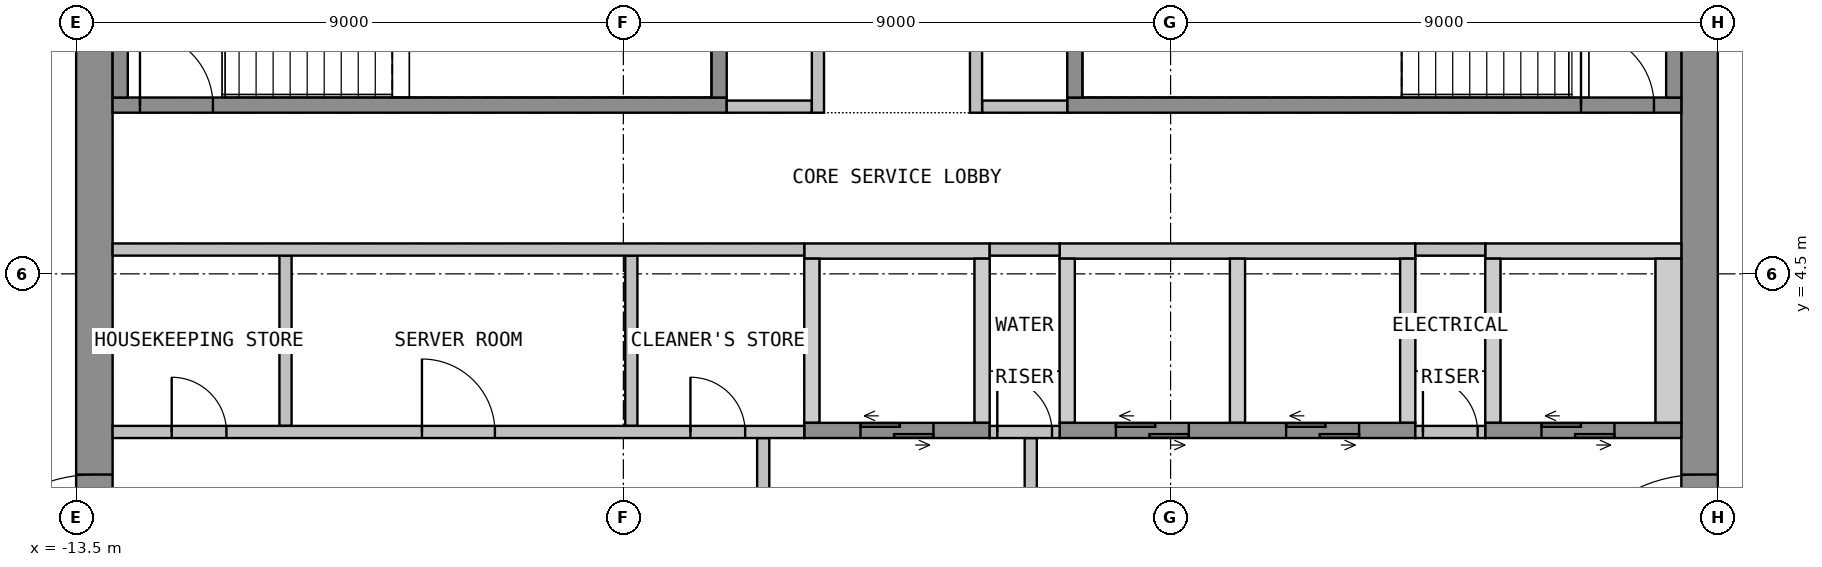
"""IFC4 building model, lengths in metres.
Left out: names, types, materials, properties, quantities, classifications, styles, units other than length and angle.
Written with IfcOpenShell. Run it as: python <this file> out.ifc"""

import sys

from ifc_helpers import new_model, si_unit, direction, frame, frame_2d, origin, place, context, subcontext, project, spatial, polyline, rectangle, outline, extrude, element, fill, save


model = new_model("IFC4")
c1 = context("Model", 3, precision=1e-05, world=origin(), true_north=direction((0.0, 1.0)))
c2 = subcontext(c1, "Body", "Model", "MODEL_VIEW")
j1 = project(units=[si_unit("LENGTHUNIT", "METRE"), si_unit("PLANEANGLEUNIT", "RADIAN")], contexts=[c1])
p1 = place(None, origin())
s1 = spatial("IfcSite", under=j1, at=p1, CompositionType="ELEMENT")
p2 = place(p1, origin())
s2 = spatial("IfcBuilding", under=s1, at=p2, CompositionType="ELEMENT")
p3 = place(p2, frame((0.0, 0.0, 246.9)))
s3 = spatial("IfcBuildingStorey", under=s2, at=p3, CompositionType="ELEMENT", Elevation=246.9)
p4 = place(p3, frame((-13.2, -10.65, 0.0), z_axis=(0.0, 0.0, 1.0), x_axis=(0.0, 1.0, 0.0)))
e1 = element("IfcWall", 1, at=p4, inside=s3, PredefinedType="SHEAR", context=c2, shape_type="SweptSolid", body=[
    extrude(rectangle(XDim=21.3, YDim=0.6, at=frame_2d((10.65, 0.0))), origin(), (0.0, 0.0, 1.0), 3.575),
])
p5 = place(p4, frame((9.45, 0.0, 0.0)))
e2 = element("IfcOpeningElement", 2, at=p5, cuts=e1, PredefinedType="OPENING", context=c2, shape_type="SweptSolid", body=[
    extrude(rectangle(XDim=2.4, YDim=2.1, at=frame_2d((1.2, 1.05))), frame((0.0, 0.31, 0.0), z_axis=(0.0, -1.0, 0.0), x_axis=(1.0, 0.0, 0.0)), (0.0, 0.0, 1.0), 0.62),
])
p6 = place(p3, frame((13.2, -10.65, 0.0), z_axis=(0.0, 0.0, 1.0), x_axis=(0.0, 1.0, 0.0)))
e3 = element("IfcWall", 3, at=p6, inside=s3, PredefinedType="SHEAR", context=c2, shape_type="SweptSolid", body=[
    extrude(rectangle(XDim=21.3, YDim=0.6, at=frame_2d((10.65, 0.0))), origin(), (0.0, 0.0, 1.0), 3.575),
])
p7 = place(p6, frame((9.45, 0.0, 0.0)))
e4 = element("IfcOpeningElement", 4, at=p7, cuts=e3, PredefinedType="OPENING", context=c2, shape_type="SweptSolid", body=[
    extrude(rectangle(XDim=2.4, YDim=2.1, at=frame_2d((1.2, 1.05))), frame((0.0, 0.31, 0.0), z_axis=(0.0, -1.0, 0.0), x_axis=(1.0, 0.0, 0.0)), (0.0, 0.0, 1.0), 0.62),
])
p8 = place(p3, origin())
e5 = element("IfcWall", 5, at=p8, inside=s3, PredefinedType="SHEAR", context=c2, shape_type="SweptSolid", body=[
    extrude(outline(polyline([(-1.525, 4.75), (1.525, 4.75), (1.525, 5.0), (-1.525, 5.0), (-1.525, 4.75)])), origin(), (0.0, 0.0, 1.0), 3.575),
])
p9 = place(p3, origin())
e6 = element("IfcWall", 6, at=p9, inside=s3, PredefinedType="SHEAR", context=c2, shape_type="SweptSolid", body=[
    extrude(outline(polyline([(2.675, 4.75), (8.525, 4.75), (8.525, 5.0), (2.675, 5.0), (2.675, 4.75)])), origin(), (0.0, 0.0, 1.0), 3.575),
])
p10 = place(p3, origin())
e7 = element("IfcWall", 7, at=p10, inside=s3, PredefinedType="SHEAR", context=c2, shape_type="SweptSolid", body=[
    extrude(outline(polyline([(9.675, 4.75), (12.9, 4.75), (12.9, 5.0), (9.675, 5.0), (9.675, 4.75)])), origin(), (0.0, 0.0, 1.0), 3.575),
])
p11 = place(p3, origin())
e8 = element("IfcWall", 8, at=p11, inside=s3, PredefinedType="SHEAR", context=c2, shape_type="SweptSolid", body=[
    extrude(outline(polyline([(-1.525, 2.05), (-1.275, 2.05), (-1.275, 4.75), (-1.525, 4.75), (-1.525, 2.05)])), origin(), (0.0, 0.0, 1.0), 3.575),
])
p12 = place(p3, origin())
e9 = element("IfcWall", 9, at=p12, inside=s3, PredefinedType="SHEAR", context=c2, shape_type="SweptSolid", body=[
    extrude(outline(polyline([(1.275, 2.05), (1.525, 2.05), (1.525, 4.75), (1.275, 4.75), (1.275, 2.05)])), origin(), (0.0, 0.0, 1.0), 3.575),
])
p13 = place(p3, origin())
e10 = element("IfcWall", 10, at=p13, inside=s3, PredefinedType="SHEAR", context=c2, shape_type="SweptSolid", body=[
    extrude(outline(polyline([(2.675, 2.05), (2.925, 2.05), (2.925, 4.75), (2.675, 4.75), (2.675, 2.05)])), origin(), (0.0, 0.0, 1.0), 3.575),
])
p14 = place(p3, origin())
e11 = element("IfcWall", 11, at=p14, inside=s3, PredefinedType="SHEAR", context=c2, shape_type="SweptSolid", body=[
    extrude(outline(polyline([(5.475, 2.05), (5.725, 2.05), (5.725, 4.75), (5.475, 4.75), (5.475, 2.05)])), origin(), (0.0, 0.0, 1.0), 3.575),
])
p15 = place(p3, origin())
e12 = element("IfcWall", 12, at=p15, inside=s3, PredefinedType="SHEAR", context=c2, shape_type="SweptSolid", body=[
    extrude(outline(polyline([(8.275, 2.05), (8.525, 2.05), (8.525, 4.75), (8.275, 4.75), (8.275, 2.05)])), origin(), (0.0, 0.0, 1.0), 3.575),
])
p16 = place(p3, origin())
e13 = element("IfcWall", 13, at=p16, inside=s3, PredefinedType="SHEAR", context=c2, shape_type="SweptSolid", body=[
    extrude(outline(polyline([(9.675, 2.05), (9.925, 2.05), (9.925, 4.75), (9.675, 4.75), (9.675, 2.05)])), origin(), (0.0, 0.0, 1.0), 3.575),
])
p17 = place(p3, origin())
e14 = element("IfcWall", 14, at=p17, inside=s3, PredefinedType="SHEAR", context=c2, shape_type="SweptSolid", body=[
    extrude(outline(polyline([(12.475, 2.05), (12.9, 2.05), (12.9, 4.75), (12.475, 4.75), (12.475, 2.05)])), origin(), (0.0, 0.0, 1.0), 3.575),
])
p18 = place(p3, frame((-1.525, 1.925, 0.0), z_axis=(0.0, 0.0, 1.0), x_axis=(1.0, 0.0, 0.0)))
e15 = element("IfcWall", 15, at=p18, inside=s3, PredefinedType="SHEAR", context=c2, shape_type="SweptSolid", body=[
    extrude(rectangle(XDim=3.05, YDim=0.25, at=frame_2d((1.525, 0.0))), origin(), (0.0, 0.0, 1.0), 3.575),
])
p19 = place(p18, frame((0.925, 0.0, 0.0)))
e16 = element("IfcOpeningElement", 16, at=p19, cuts=e15, PredefinedType="OPENING", context=c2, shape_type="SweptSolid", body=[
    extrude(rectangle(XDim=1.2, YDim=2.1, at=frame_2d((0.6, 1.05))), frame((0.0, 0.135, 0.0), z_axis=(0.0, -1.0, 0.0), x_axis=(1.0, 0.0, 0.0)), (0.0, 0.0, 1.0), 0.27),
])
p20 = place(p3, frame((2.675, 1.925, 0.0), z_axis=(0.0, 0.0, 1.0), x_axis=(1.0, 0.0, 0.0)))
e17 = element("IfcWall", 17, at=p20, inside=s3, PredefinedType="SHEAR", context=c2, shape_type="SweptSolid", body=[
    extrude(rectangle(XDim=5.85, YDim=0.25, at=frame_2d((2.925, 0.0))), origin(), (0.0, 0.0, 1.0), 3.575),
])
p21 = place(p20, frame((0.925, 0.0, 0.0)))
e18 = element("IfcOpeningElement", 18, at=p21, cuts=e17, PredefinedType="OPENING", context=c2, shape_type="SweptSolid", body=[
    extrude(rectangle(XDim=1.2, YDim=2.1, at=frame_2d((0.6, 1.05))), frame((0.0, 0.135, 0.0), z_axis=(0.0, -1.0, 0.0), x_axis=(1.0, 0.0, 0.0)), (0.0, 0.0, 1.0), 0.27),
])
p22 = place(p20, frame((3.725, 0.0, 0.0)))
e19 = element("IfcOpeningElement", 19, at=p22, cuts=e17, PredefinedType="OPENING", context=c2, shape_type="SweptSolid", body=[
    extrude(rectangle(XDim=1.2, YDim=2.1, at=frame_2d((0.6, 1.05))), frame((0.0, 0.135, 0.0), z_axis=(0.0, -1.0, 0.0), x_axis=(1.0, 0.0, 0.0)), (0.0, 0.0, 1.0), 0.27),
])
p23 = place(p3, frame((9.675, 1.925, 0.0), z_axis=(0.0, 0.0, 1.0), x_axis=(1.0, 0.0, 0.0)))
e20 = element("IfcWall", 20, at=p23, inside=s3, PredefinedType="SHEAR", context=c2, shape_type="SweptSolid", body=[
    extrude(rectangle(XDim=3.225, YDim=0.25, at=frame_2d((1.612, 0.0))), origin(), (0.0, 0.0, 1.0), 3.575),
])
p24 = place(p23, frame((0.925, 0.0, 0.0)))
e21 = element("IfcOpeningElement", 21, at=p24, cuts=e20, PredefinedType="OPENING", context=c2, shape_type="SweptSolid", body=[
    extrude(rectangle(XDim=1.2, YDim=2.1, at=frame_2d((0.6, 1.05))), frame((0.0, 0.135, 0.0), z_axis=(0.0, -1.0, 0.0), x_axis=(1.0, 0.0, 0.0)), (0.0, 0.0, 1.0), 0.27),
])
p25 = place(p3, frame((-2.2, -1.8, 0.0), z_axis=(0.0, 0.0, 1.0), x_axis=(0.0, 1.0, 0.0)))
e22 = element("IfcWall", 22, at=p25, inside=s3, PredefinedType="PARTITIONING", context=c2, shape_type="SweptSolid", body=[
    extrude(rectangle(XDim=3.6, YDim=0.2, at=frame_2d((1.8, 0.0))), origin(), (0.0, 0.0, 1.0), 3.575),
])
p26 = place(p25, frame((1.2, 0.0, 0.0)))
e23 = element("IfcOpeningElement", 23, at=p26, cuts=e22, PredefinedType="OPENING", context=c2, shape_type="SweptSolid", body=[
    extrude(rectangle(XDim=1.2, YDim=2.1, at=frame_2d((0.6, 1.05))), frame((0.0, 0.11, 0.0), z_axis=(0.0, -1.0, 0.0), x_axis=(1.0, 0.0, 0.0)), (0.0, 0.0, 1.0), 0.22),
])
p27 = place(p3, frame((2.2, -1.8, 0.0), z_axis=(0.0, 0.0, 1.0), x_axis=(0.0, 1.0, 0.0)))
e24 = element("IfcWall", 24, at=p27, inside=s3, PredefinedType="PARTITIONING", context=c2, shape_type="SweptSolid", body=[
    extrude(rectangle(XDim=3.6, YDim=0.2, at=frame_2d((1.8, 0.0))), origin(), (0.0, 0.0, 1.0), 3.575),
])
p28 = place(p27, frame((1.2, 0.0, 0.0)))
e25 = element("IfcOpeningElement", 25, at=p28, cuts=e24, PredefinedType="OPENING", context=c2, shape_type="SweptSolid", body=[
    extrude(rectangle(XDim=1.2, YDim=2.1, at=frame_2d((0.6, 1.05))), frame((0.0, 0.11, 0.0), z_axis=(0.0, -1.0, 0.0), x_axis=(1.0, 0.0, 0.0)), (0.0, 0.0, 1.0), 0.22),
])
p29 = place(p3, frame((-12.9, 7.275, 0.0), z_axis=(0.0, 0.0, 1.0), x_axis=(1.0, 0.0, 0.0)))
e26 = element("IfcWall", 26, at=p29, inside=s3, PredefinedType="SHEAR", context=c2, shape_type="SweptSolid", body=[
    extrude(rectangle(XDim=10.1, YDim=0.25, at=frame_2d((5.05, 0.0))), origin(), (0.0, 0.0, 1.0), 3.575),
])
p30 = place(p29, frame((0.45, 0.0, 0.0)))
e27 = element("IfcOpeningElement", 27, at=p30, cuts=e26, PredefinedType="OPENING", context=c2, shape_type="SweptSolid", body=[
    extrude(rectangle(XDim=1.2, YDim=2.1, at=frame_2d((0.6, 1.05))), frame((0.0, 0.135, 0.0), z_axis=(0.0, -1.0, 0.0), x_axis=(1.0, 0.0, 0.0)), (0.0, 0.0, 1.0), 0.27),
])
for number, where, z_axis, x_axis in (
    (28, (-12.775, 7.4, 0.0), (0.0, 0.0, 1.0), (0.0, 1.0, 0.0)),
    (29, (-2.925, 7.4, 0.0), (0.0, 0.0, 1.0), (0.0, 1.0, 0.0)),
):
    element("IfcWall", number, at=place(p3, frame(where, z_axis=z_axis, x_axis=x_axis)), inside=s3, PredefinedType="SHEAR", context=c2, shape_type="SweptSolid", body=[
        extrude(rectangle(XDim=3.25, YDim=0.25, at=frame_2d((1.625, 0.0))), origin(), (0.0, 0.0, 1.0), 3.575),
    ])
p31 = place(p3, frame((2.8, 7.275, 0.0), z_axis=(0.0, 0.0, 1.0), x_axis=(1.0, 0.0, 0.0)))
e30 = element("IfcWall", 30, at=p31, inside=s3, PredefinedType="SHEAR", context=c2, shape_type="SweptSolid", body=[
    extrude(rectangle(XDim=10.1, YDim=0.25, at=frame_2d((5.05, 0.0))), origin(), (0.0, 0.0, 1.0), 3.575),
])
p32 = place(p31, frame((8.45, 0.0, 0.0)))
e31 = element("IfcOpeningElement", 31, at=p32, cuts=e30, PredefinedType="OPENING", context=c2, shape_type="SweptSolid", body=[
    extrude(rectangle(XDim=1.2, YDim=2.1, at=frame_2d((0.6, 1.05))), frame((0.0, 0.135, 0.0), z_axis=(0.0, -1.0, 0.0), x_axis=(1.0, 0.0, 0.0)), (0.0, 0.0, 1.0), 0.27),
])
for number, where, z_axis, x_axis in (
    (32, (2.925, 7.4, 0.0), (0.0, 0.0, 1.0), (0.0, 1.0, 0.0)),
    (33, (12.775, 7.4, 0.0), (0.0, 0.0, 1.0), (0.0, 1.0, 0.0)),
):
    element("IfcWall", number, at=place(p3, frame(where, z_axis=z_axis, x_axis=x_axis)), inside=s3, PredefinedType="SHEAR", context=c2, shape_type="SweptSolid", body=[
        extrude(rectangle(XDim=3.25, YDim=0.25, at=frame_2d((1.625, 0.0))), origin(), (0.0, 0.0, 1.0), 3.575),
    ])
for number, where, z_axis, x_axis in (
    (34, (-2.8, 7.25, 0.0), (0.0, 0.0, 1.0), (1.0, 0.0, 0.0)),
    (35, (1.4, 7.25, 0.0), (0.0, 0.0, 1.0), (1.0, 0.0, 0.0)),
):
    element("IfcWall", number, at=place(p3, frame(where, z_axis=z_axis, x_axis=x_axis)), inside=s3, PredefinedType="PARTITIONING", context=c2, shape_type="SweptSolid", body=[
        extrude(rectangle(XDim=1.4, YDim=0.2, at=frame_2d((0.7, 0.0))), origin(), (0.0, 0.0, 1.0), 3.575),
    ])
p33 = place(p3, frame((-1.3, 7.15, 0.0), z_axis=(0.0, 0.0, 1.0), x_axis=(0.0, 1.0, 0.0)))
e36 = element("IfcWall", 36, at=p33, inside=s3, PredefinedType="PARTITIONING", context=c2, shape_type="SweptSolid", body=[
    extrude(rectangle(XDim=3.5, YDim=0.2, at=frame_2d((1.75, 0.0))), origin(), (0.0, 0.0, 1.0), 3.575),
])
p34 = place(p33, frame((1.4, 0.0, 0.0)))
e37 = element("IfcOpeningElement", 37, at=p34, cuts=e36, PredefinedType="OPENING", context=c2, shape_type="SweptSolid", body=[
    extrude(rectangle(XDim=0.9, YDim=2.1, at=frame_2d((0.45, 1.05))), frame((0.0, 0.11, 0.0), z_axis=(0.0, -1.0, 0.0), x_axis=(1.0, 0.0, 0.0)), (0.0, 0.0, 1.0), 0.22),
])
p35 = place(p3, frame((1.3, 7.15, 0.0), z_axis=(0.0, 0.0, 1.0), x_axis=(0.0, 1.0, 0.0)))
e38 = element("IfcWall", 38, at=p35, inside=s3, PredefinedType="PARTITIONING", context=c2, shape_type="SweptSolid", body=[
    extrude(rectangle(XDim=3.5, YDim=0.2, at=frame_2d((1.75, 0.0))), origin(), (0.0, 0.0, 1.0), 3.575),
])
p36 = place(p35, frame((1.4, 0.0, 0.0)))
e39 = element("IfcOpeningElement", 39, at=p36, cuts=e38, PredefinedType="OPENING", context=c2, shape_type="SweptSolid", body=[
    extrude(rectangle(XDim=0.9, YDim=2.1, at=frame_2d((0.45, 1.05))), frame((0.0, 0.11, 0.0), z_axis=(0.0, -1.0, 0.0), x_axis=(1.0, 0.0, 0.0)), (0.0, 0.0, 1.0), 0.22),
])
for number, where, z_axis, x_axis in (
    (40, (-10.056, 2.0, 0.0), (0.0, 0.0, 1.0), (0.0, 1.0, 0.0)),
    (41, (-4.369, 2.0, 0.0), (0.0, 0.0, 1.0), (0.0, 1.0, 0.0)),
):
    element("IfcWall", number, at=place(p3, frame(where, z_axis=z_axis, x_axis=x_axis)), inside=s3, PredefinedType="PARTITIONING", context=c2, shape_type="SweptSolid", body=[
        extrude(rectangle(XDim=2.8, YDim=0.2, at=frame_2d((1.4, 0.0))), origin(), (0.0, 0.0, 1.0), 3.575),
    ])
p37 = place(p3, frame((-12.9, 1.9, 0.0), z_axis=(0.0, 0.0, 1.0), x_axis=(1.0, 0.0, 0.0)))
e42 = element("IfcWall", 42, at=p37, inside=s3, PredefinedType="PARTITIONING", context=c2, shape_type="SweptSolid", body=[
    extrude(rectangle(XDim=11.375, YDim=0.2, at=frame_2d((5.688, 0.0))), origin(), (0.0, 0.0, 1.0), 3.575),
])
p38 = place(p37, frame((0.972, 0.0, 0.0)))
e43 = element("IfcOpeningElement", 43, at=p38, cuts=e42, PredefinedType="OPENING", context=c2, shape_type="SweptSolid", body=[
    extrude(rectangle(XDim=0.9, YDim=2.1, at=frame_2d((0.45, 1.05))), frame((0.0, 0.11, 0.0), z_axis=(0.0, -1.0, 0.0), x_axis=(1.0, 0.0, 0.0)), (0.0, 0.0, 1.0), 0.22),
])
p39 = place(p37, frame((5.087, 0.0, 0.0)))
e44 = element("IfcOpeningElement", 44, at=p39, cuts=e42, PredefinedType="OPENING", context=c2, shape_type="SweptSolid", body=[
    extrude(rectangle(XDim=1.2, YDim=2.1, at=frame_2d((0.6, 1.05))), frame((0.0, 0.11, 0.0), z_axis=(0.0, -1.0, 0.0), x_axis=(1.0, 0.0, 0.0)), (0.0, 0.0, 1.0), 0.22),
])
p40 = place(p37, frame((9.503, 0.0, 0.0)))
e45 = element("IfcOpeningElement", 45, at=p40, cuts=e42, PredefinedType="OPENING", context=c2, shape_type="SweptSolid", body=[
    extrude(rectangle(XDim=0.9, YDim=2.1, at=frame_2d((0.45, 1.05))), frame((0.0, 0.11, 0.0), z_axis=(0.0, -1.0, 0.0), x_axis=(1.0, 0.0, 0.0)), (0.0, 0.0, 1.0), 0.22),
])
p41 = place(p3, frame((-12.9, 4.9, 0.0), z_axis=(0.0, 0.0, 1.0), x_axis=(1.0, 0.0, 0.0)))
e46 = element("IfcWall", 46, at=p41, inside=s3, PredefinedType="PARTITIONING", context=c2, shape_type="SweptSolid", body=[
    extrude(rectangle(XDim=11.375, YDim=0.2, at=frame_2d((5.688, 0.0))), origin(), (0.0, 0.0, 1.0), 3.575),
])
p42 = place(p3, frame((1.525, 1.9, 0.0), z_axis=(0.0, 0.0, 1.0), x_axis=(1.0, 0.0, 0.0)))
e47 = element("IfcWall", 47, at=p42, inside=s3, PredefinedType="PARTITIONING", context=c2, shape_type="SweptSolid", body=[
    extrude(rectangle(XDim=1.15, YDim=0.2, at=frame_2d((0.575, 0.0))), origin(), (0.0, 0.0, 1.0), 3.575),
])
p43 = place(p42, frame((0.125, 0.0, 0.0)))
e48 = element("IfcOpeningElement", 48, at=p43, cuts=e47, PredefinedType="OPENING", context=c2, shape_type="SweptSolid", body=[
    extrude(rectangle(XDim=0.9, YDim=2.1, at=frame_2d((0.45, 1.05))), frame((0.0, 0.11, 0.0), z_axis=(0.0, -1.0, 0.0), x_axis=(1.0, 0.0, 0.0)), (0.0, 0.0, 1.0), 0.22),
])
p44 = place(p3, frame((1.525, 4.9, 0.0), z_axis=(0.0, 0.0, 1.0), x_axis=(1.0, 0.0, 0.0)))
e49 = element("IfcWall", 49, at=p44, inside=s3, PredefinedType="PARTITIONING", context=c2, shape_type="SweptSolid", body=[
    extrude(rectangle(XDim=1.15, YDim=0.2, at=frame_2d((0.575, 0.0))), origin(), (0.0, 0.0, 1.0), 3.575),
])
p45 = place(p3, frame((8.525, 1.9, 0.0), z_axis=(0.0, 0.0, 1.0), x_axis=(1.0, 0.0, 0.0)))
e50 = element("IfcWall", 50, at=p45, inside=s3, PredefinedType="PARTITIONING", context=c2, shape_type="SweptSolid", body=[
    extrude(rectangle(XDim=1.15, YDim=0.2, at=frame_2d((0.575, 0.0))), origin(), (0.0, 0.0, 1.0), 3.575),
])
p46 = place(p45, frame((0.125, 0.0, 0.0)))
e51 = element("IfcOpeningElement", 51, at=p46, cuts=e50, PredefinedType="OPENING", context=c2, shape_type="SweptSolid", body=[
    extrude(rectangle(XDim=0.9, YDim=2.1, at=frame_2d((0.45, 1.05))), frame((0.0, 0.11, 0.0), z_axis=(0.0, -1.0, 0.0), x_axis=(1.0, 0.0, 0.0)), (0.0, 0.0, 1.0), 0.22),
])
p47 = place(p3, frame((8.525, 4.9, 0.0), z_axis=(0.0, 0.0, 1.0), x_axis=(1.0, 0.0, 0.0)))
e52 = element("IfcWall", 52, at=p47, inside=s3, PredefinedType="PARTITIONING", context=c2, shape_type="SweptSolid", body=[
    extrude(rectangle(XDim=1.15, YDim=0.2, at=frame_2d((0.575, 0.0))), origin(), (0.0, 0.0, 1.0), 3.575),
])
p48 = place(p5, origin())
e53 = element("IfcDoor", 53, at=p48, inside=s3, OperationType="DOUBLE_DOOR_DOUBLE_SWING", PredefinedType="DOOR", context=c2, shape_type="SweptSolid", body=[
    extrude(rectangle(XDim=2.4, YDim=2.1, at=frame_2d((1.2, 1.05))), frame((0.0, 0.025, 0.0), z_axis=(0.0, -1.0, 0.0), x_axis=(1.0, 0.0, 0.0)), (0.0, 0.0, 1.0), 0.05),
])
fill(e2, e53)
p49 = place(p7, origin())
e54 = element("IfcDoor", 54, at=p49, inside=s3, OperationType="DOUBLE_DOOR_DOUBLE_SWING", PredefinedType="DOOR", context=c2, shape_type="SweptSolid", body=[
    extrude(rectangle(XDim=2.4, YDim=2.1, at=frame_2d((1.2, 1.05))), frame((0.0, 0.025, 0.0), z_axis=(0.0, -1.0, 0.0), x_axis=(1.0, 0.0, 0.0)), (0.0, 0.0, 1.0), 0.05),
])
fill(e4, e54)
p50 = place(p19, origin())
e55 = element("IfcDoor", 55, at=p50, inside=s3, OperationType="DOUBLE_DOOR_SLIDING", PredefinedType="DOOR", context=c2, shape_type="SweptSolid", body=[
    extrude(rectangle(XDim=1.2, YDim=2.1, at=frame_2d((0.6, 1.05))), frame((0.0, 0.025, 0.0), z_axis=(0.0, -1.0, 0.0), x_axis=(1.0, 0.0, 0.0)), (0.0, 0.0, 1.0), 0.05),
])
fill(e16, e55)
p51 = place(p21, origin())
e56 = element("IfcDoor", 56, at=p51, inside=s3, OperationType="DOUBLE_DOOR_SLIDING", PredefinedType="DOOR", context=c2, shape_type="SweptSolid", body=[
    extrude(rectangle(XDim=1.2, YDim=2.1, at=frame_2d((0.6, 1.05))), frame((0.0, 0.025, 0.0), z_axis=(0.0, -1.0, 0.0), x_axis=(1.0, 0.0, 0.0)), (0.0, 0.0, 1.0), 0.05),
])
fill(e18, e56)
p52 = place(p22, origin())
e57 = element("IfcDoor", 57, at=p52, inside=s3, OperationType="DOUBLE_DOOR_SLIDING", PredefinedType="DOOR", context=c2, shape_type="SweptSolid", body=[
    extrude(rectangle(XDim=1.2, YDim=2.1, at=frame_2d((0.6, 1.05))), frame((0.0, 0.025, 0.0), z_axis=(0.0, -1.0, 0.0), x_axis=(1.0, 0.0, 0.0)), (0.0, 0.0, 1.0), 0.05),
])
fill(e19, e57)
p53 = place(p24, origin())
e58 = element("IfcDoor", 58, at=p53, inside=s3, OperationType="DOUBLE_DOOR_SLIDING", PredefinedType="DOOR", context=c2, shape_type="SweptSolid", body=[
    extrude(rectangle(XDim=1.2, YDim=2.1, at=frame_2d((0.6, 1.05))), frame((0.0, 0.025, 0.0), z_axis=(0.0, -1.0, 0.0), x_axis=(1.0, 0.0, 0.0)), (0.0, 0.0, 1.0), 0.05),
])
fill(e21, e58)
p54 = place(p30, origin())
e59 = element("IfcDoor", 59, at=p54, inside=s3, OperationType="SINGLE_SWING_LEFT", PredefinedType="DOOR", context=c2, shape_type="SweptSolid", body=[
    extrude(rectangle(XDim=1.2, YDim=2.1, at=frame_2d((0.6, 1.05))), frame((0.0, 0.025, 0.0), z_axis=(0.0, -1.0, 0.0), x_axis=(1.0, 0.0, 0.0)), (0.0, 0.0, 1.0), 0.05),
])
fill(e27, e59)
p55 = place(p32, origin())
e60 = element("IfcDoor", 60, at=p55, inside=s3, OperationType="SINGLE_SWING_LEFT", PredefinedType="DOOR", context=c2, shape_type="SweptSolid", body=[
    extrude(rectangle(XDim=1.2, YDim=2.1, at=frame_2d((0.6, 1.05))), frame((0.0, 0.025, 0.0), z_axis=(0.0, -1.0, 0.0), x_axis=(1.0, 0.0, 0.0)), (0.0, 0.0, 1.0), 0.05),
])
fill(e31, e60)
p56 = place(p38, origin())
e61 = element("IfcDoor", 61, at=p56, inside=s3, OperationType="SINGLE_SWING_LEFT", PredefinedType="DOOR", context=c2, shape_type="SweptSolid", body=[
    extrude(rectangle(XDim=0.9, YDim=2.1, at=frame_2d((0.45, 1.05))), frame((0.0, 0.025, 0.0), z_axis=(0.0, -1.0, 0.0), x_axis=(1.0, 0.0, 0.0)), (0.0, 0.0, 1.0), 0.05),
])
fill(e43, e61)
p57 = place(p39, origin())
e62 = element("IfcDoor", 62, at=p57, inside=s3, OperationType="SINGLE_SWING_RIGHT", PredefinedType="DOOR", context=c2, shape_type="SweptSolid", body=[
    extrude(rectangle(XDim=1.2, YDim=2.1, at=frame_2d((0.6, 1.05))), frame((0.0, 0.025, 0.0), z_axis=(0.0, -1.0, 0.0), x_axis=(1.0, 0.0, 0.0)), (0.0, 0.0, 1.0), 0.05),
])
fill(e44, e62)
p58 = place(p40, origin())
e63 = element("IfcDoor", 63, at=p58, inside=s3, OperationType="SINGLE_SWING_LEFT", PredefinedType="DOOR", context=c2, shape_type="SweptSolid", body=[
    extrude(rectangle(XDim=0.9, YDim=2.1, at=frame_2d((0.45, 1.05))), frame((0.0, 0.025, 0.0), z_axis=(0.0, -1.0, 0.0), x_axis=(1.0, 0.0, 0.0)), (0.0, 0.0, 1.0), 0.05),
])
fill(e45, e63)
p59 = place(p43, origin())
e64 = element("IfcDoor", 64, at=p59, inside=s3, OperationType="SINGLE_SWING_LEFT", PredefinedType="DOOR", context=c2, shape_type="SweptSolid", body=[
    extrude(rectangle(XDim=0.9, YDim=2.1, at=frame_2d((0.45, 1.05))), frame((0.0, 0.025, 0.0), z_axis=(0.0, -1.0, 0.0), x_axis=(1.0, 0.0, 0.0)), (0.0, 0.0, 1.0), 0.05),
])
fill(e48, e64)
p60 = place(p46, origin())
e65 = element("IfcDoor", 65, at=p60, inside=s3, OperationType="SINGLE_SWING_LEFT", PredefinedType="DOOR", context=c2, shape_type="SweptSolid", body=[
    extrude(rectangle(XDim=0.9, YDim=2.1, at=frame_2d((0.45, 1.05))), frame((0.0, 0.025, 0.0), z_axis=(0.0, -1.0, 0.0), x_axis=(1.0, 0.0, 0.0)), (0.0, 0.0, 1.0), 0.05),
])
fill(e51, e65)
save(model, sys.argv[1])
